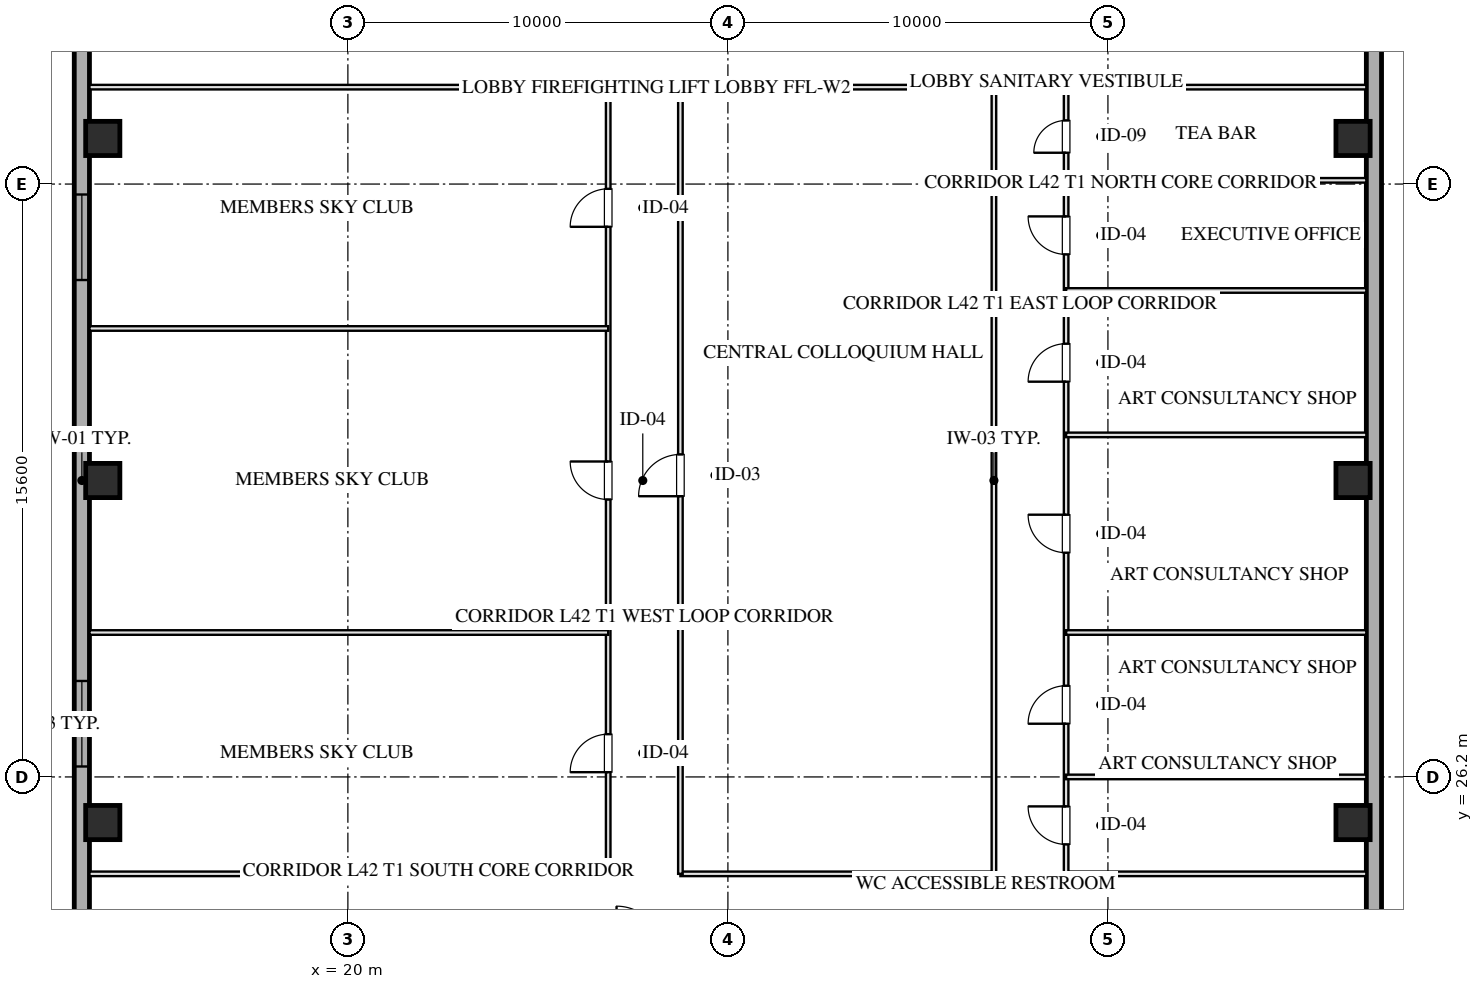
"""IFC4 building model, lengths in metres.
Left out: names, types, materials, properties, quantities, classifications, styles, units other than length and angle.
Written with IfcOpenShell. Run it as: python <this file> out.ifc"""

import sys

from ifc_helpers import new_model, si_unit, direction, frame, frame_2d, origin, origin_2d, place, context, subcontext, project, spatial, rectangle, hollow_rectangle, extrude, element, fill, save


model = new_model("IFC4")
c1 = context("Model", 3, precision=1e-05, world=origin(), true_north=direction((0.0, 1.0)))
c2 = subcontext(c1, "Body", "Model", "MODEL_VIEW")
j1 = project(units=[si_unit("LENGTHUNIT", "METRE"), si_unit("PLANEANGLEUNIT", "RADIAN")], contexts=[c1])
p1 = place(None, origin())
s1 = spatial("IfcSite", under=j1, at=p1, CompositionType="ELEMENT")
p2 = place(p1, origin())
s2 = spatial("IfcBuilding", under=s1, at=p2, CompositionType="ELEMENT")
p3 = place(p2, frame((0.0, 0.0, 159.85)))
s3 = spatial("IfcBuildingStorey", under=s2, at=p3, CompositionType="ELEMENT", Elevation=159.85)
for number, where, z_axis, x_axis in (
    (1, (13.55, 25.0, 0.0), (0.0, 0.0, 1.0), (1.0, 0.0, 0.0)),
    (2, (13.55, 34.0, 0.0), (0.0, 0.0, 1.0), (1.0, 0.0, 0.0)),
    (3, (13.55, 43.0, 0.0), (0.0, 0.0, 1.0), (1.0, 0.0, 0.0)),
    (4, (46.45, 25.0, 0.0), (0.0, 0.0, 1.0), (1.0, 0.0, 0.0)),
    (5, (46.45, 34.0, 0.0), (0.0, 0.0, 1.0), (1.0, 0.0, 0.0)),
    (6, (46.45, 43.0, 0.0), (0.0, 0.0, 1.0), (1.0, 0.0, 0.0)),
):
    element("IfcColumn", number, at=place(p3, frame(where, z_axis=z_axis, x_axis=x_axis)), inside=s3, PredefinedType="COLUMN", context=c2, shape_type="SweptSolid", body=[
        extrude(hollow_rectangle(XDim=0.9, YDim=0.9, WallThickness=0.032, at=origin_2d()), origin(), (0.0, 0.0, 1.0), 3.451),
    ])
p4 = place(p3, frame((13.0, 10.8, 0.0), z_axis=(0.0, 0.0, 1.0), x_axis=(0.0, 1.0, 0.0)))
e7 = element("IfcWall", 7, at=p4, inside=s3, PredefinedType="SOLIDWALL", context=c2, shape_type="SweptSolid", body=[
    extrude(rectangle(XDim=46.4, YDim=0.4, at=frame_2d((23.2, 0.0))), origin(), (0.0, 0.0, 1.0), 2.61),
])
p5 = place(p4, frame((15.675, 0.0, 0.75)))
e8 = element("IfcOpeningElement", 8, at=p5, cuts=e7, PredefinedType="OPENING", context=c2, shape_type="SweptSolid", body=[
    extrude(rectangle(XDim=2.25, YDim=1.46, at=frame_2d((1.125, 0.73))), frame((0.0, 0.21, 0.0), z_axis=(0.0, -1.0, 0.0), x_axis=(1.0, 0.0, 0.0)), (0.0, 0.0, 1.0), 0.42),
])
p6 = place(p4, frame((28.475, 0.0, 0.75)))
e9 = element("IfcOpeningElement", 9, at=p6, cuts=e7, PredefinedType="OPENING", context=c2, shape_type="SweptSolid", body=[
    extrude(rectangle(XDim=2.25, YDim=1.46, at=frame_2d((1.125, 0.73))), frame((0.0, 0.21, 0.0), z_axis=(0.0, -1.0, 0.0), x_axis=(1.0, 0.0, 0.0)), (0.0, 0.0, 1.0), 0.42),
])
p7 = place(p3, frame((47.0, 57.2, 0.0), z_axis=(0.0, 0.0, 1.0), x_axis=(0.0, -1.0, 0.0)))
e10 = element("IfcWall", 10, at=p7, inside=s3, PredefinedType="SOLIDWALL", context=c2, shape_type="SweptSolid", body=[
    extrude(rectangle(XDim=46.4, YDim=0.4, at=frame_2d((23.2, 0.0))), origin(), (0.0, 0.0, 1.0), 2.61),
])
p8 = place(p3, frame((13.2, 23.65, 0.0), z_axis=(0.0, 0.0, 1.0), x_axis=(1.0, 0.0, 0.0)))
e11 = element("IfcWall", 11, at=p8, inside=s3, PredefinedType="PARTITIONING", context=c2, shape_type="SweptSolid", body=[
    extrude(rectangle(XDim=13.65, YDim=0.12, at=frame_2d((6.825, 0.0))), origin(), (0.0, 0.0, 1.0), 3.175),
])
p9 = place(p3, frame((28.75, 23.65, 0.0), z_axis=(0.0, 0.0, 1.0), x_axis=(1.0, 0.0, 0.0)))
e12 = element("IfcWall", 12, at=p9, inside=s3, PredefinedType="PARTITIONING", context=c2, shape_type="SweptSolid", body=[
    extrude(rectangle(XDim=8.25, YDim=0.12, at=frame_2d((4.125, 0.0))), origin(), (0.0, 0.0, 1.0), 3.175),
])
p10 = place(p3, frame((38.9, 23.65, 0.0), z_axis=(0.0, 0.0, 1.0), x_axis=(1.0, 0.0, 0.0)))
e13 = element("IfcWall", 13, at=p10, inside=s3, PredefinedType="PARTITIONING", context=c2, shape_type="SweptSolid", body=[
    extrude(rectangle(XDim=7.9, YDim=0.12, at=frame_2d((3.95, 0.0))), origin(), (0.0, 0.0, 1.0), 3.175),
])
p11 = place(p3, frame((13.2, 44.35, 0.0), z_axis=(0.0, 0.0, 1.0), x_axis=(1.0, 0.0, 0.0)))
e14 = element("IfcWall", 14, at=p11, inside=s3, PredefinedType="PARTITIONING", context=c2, shape_type="SweptSolid", body=[
    extrude(rectangle(XDim=13.65, YDim=0.12, at=frame_2d((6.825, 0.0))), origin(), (0.0, 0.0, 1.0), 3.175),
])
p12 = place(p3, frame((28.75, 44.35, 0.0), z_axis=(0.0, 0.0, 1.0), x_axis=(1.0, 0.0, 0.0)))
e15 = element("IfcWall", 15, at=p12, inside=s3, PredefinedType="PARTITIONING", context=c2, shape_type="SweptSolid", body=[
    extrude(rectangle(XDim=8.25, YDim=0.12, at=frame_2d((4.125, 0.0))), origin(), (0.0, 0.0, 1.0), 3.175),
])
p13 = place(p3, frame((38.9, 44.35, 0.0), z_axis=(0.0, 0.0, 1.0), x_axis=(1.0, 0.0, 0.0)))
e16 = element("IfcWall", 16, at=p13, inside=s3, PredefinedType="PARTITIONING", context=c2, shape_type="SweptSolid", body=[
    extrude(rectangle(XDim=7.9, YDim=0.12, at=frame_2d((3.95, 0.0))), origin(), (0.0, 0.0, 1.0), 3.175),
])
p14 = place(p3, frame((26.85, 23.65, 0.0), z_axis=(0.0, 0.0, 1.0), x_axis=(0.0, 1.0, 0.0)))
e17 = element("IfcWall", 17, at=p14, inside=s3, PredefinedType="PARTITIONING", context=c2, shape_type="SweptSolid", body=[
    extrude(rectangle(XDim=20.7, YDim=0.12, at=frame_2d((10.35, 0.0))), origin(), (0.0, 0.0, 1.0), 3.175),
])
p15 = place(p14, frame((2.675, 0.0, 0.0)))
e18 = element("IfcOpeningElement", 18, at=p15, cuts=e17, PredefinedType="OPENING", context=c2, shape_type="SweptSolid", body=[
    extrude(rectangle(XDim=1.0, YDim=2.05, at=frame_2d((0.5, 1.025))), frame((0.0, 0.07, 0.0), z_axis=(0.0, -1.0, 0.0), x_axis=(1.0, 0.0, 0.0)), (0.0, 0.0, 1.0), 0.14),
])
p16 = place(p14, frame((9.85, 0.0, 0.0)))
e19 = element("IfcOpeningElement", 19, at=p16, cuts=e17, PredefinedType="OPENING", context=c2, shape_type="SweptSolid", body=[
    extrude(rectangle(XDim=1.0, YDim=2.05, at=frame_2d((0.5, 1.025))), frame((0.0, 0.07, 0.0), z_axis=(0.0, -1.0, 0.0), x_axis=(1.0, 0.0, 0.0)), (0.0, 0.0, 1.0), 0.14),
])
p17 = place(p14, frame((17.025, 0.0, 0.0)))
e20 = element("IfcOpeningElement", 20, at=p17, cuts=e17, PredefinedType="OPENING", context=c2, shape_type="SweptSolid", body=[
    extrude(rectangle(XDim=1.0, YDim=2.05, at=frame_2d((0.5, 1.025))), frame((0.0, 0.07, 0.0), z_axis=(0.0, -1.0, 0.0), x_axis=(1.0, 0.0, 0.0)), (0.0, 0.0, 1.0), 0.14),
])
p18 = place(p3, frame((28.75, 23.65, 0.0), z_axis=(0.0, 0.0, 1.0), x_axis=(0.0, 1.0, 0.0)))
e21 = element("IfcWall", 21, at=p18, inside=s3, PredefinedType="PARTITIONING", context=c2, shape_type="SweptSolid", body=[
    extrude(rectangle(XDim=20.7, YDim=0.12, at=frame_2d((10.35, 0.0))), origin(), (0.0, 0.0, 1.0), 3.175),
])
p19 = place(p18, frame((9.936, 0.0, 0.0)))
e22 = element("IfcOpeningElement", 22, at=p19, cuts=e21, PredefinedType="OPENING", context=c2, shape_type="SweptSolid", body=[
    extrude(rectangle(XDim=1.1, YDim=2.05, at=frame_2d((0.55, 1.025))), frame((0.0, 0.07, 0.0), z_axis=(0.0, -1.0, 0.0), x_axis=(1.0, 0.0, 0.0)), (0.0, 0.0, 1.0), 0.14),
])
p20 = place(p3, frame((37.0, 23.65, 0.0), z_axis=(0.0, 0.0, 1.0), x_axis=(0.0, 1.0, 0.0)))
e23 = element("IfcWall", 23, at=p20, inside=s3, PredefinedType="PARTITIONING", context=c2, shape_type="SweptSolid", body=[
    extrude(rectangle(XDim=20.7, YDim=0.12, at=frame_2d((10.35, 0.0))), origin(), (0.0, 0.0, 1.0), 3.175),
])
p21 = place(p3, frame((38.9, 23.65, 0.0), z_axis=(0.0, 0.0, 1.0), x_axis=(0.0, 1.0, 0.0)))
e24 = element("IfcWall", 24, at=p21, inside=s3, PredefinedType="PARTITIONING", context=c2, shape_type="SweptSolid", body=[
    extrude(rectangle(XDim=20.7, YDim=0.12, at=frame_2d((10.35, 0.0))), origin(), (0.0, 0.0, 1.0), 3.175),
])
p22 = place(p21, frame((0.775, 0.0, 0.0)))
e25 = element("IfcOpeningElement", 25, at=p22, cuts=e24, PredefinedType="OPENING", context=c2, shape_type="SweptSolid", body=[
    extrude(rectangle(XDim=1.0, YDim=2.05, at=frame_2d((0.5, 1.025))), frame((0.0, 0.07, 0.0), z_axis=(0.0, -1.0, 0.0), x_axis=(1.0, 0.0, 0.0)), (0.0, 0.0, 1.0), 0.14),
])
p23 = place(p21, frame((3.95, 0.0, 0.0)))
e26 = element("IfcOpeningElement", 26, at=p23, cuts=e24, PredefinedType="OPENING", context=c2, shape_type="SweptSolid", body=[
    extrude(rectangle(XDim=1.0, YDim=2.05, at=frame_2d((0.5, 1.025))), frame((0.0, 0.07, 0.0), z_axis=(0.0, -1.0, 0.0), x_axis=(1.0, 0.0, 0.0)), (0.0, 0.0, 1.0), 0.14),
])
p24 = place(p21, frame((8.45, 0.0, 0.0)))
e27 = element("IfcOpeningElement", 27, at=p24, cuts=e24, PredefinedType="OPENING", context=c2, shape_type="SweptSolid", body=[
    extrude(rectangle(XDim=1.0, YDim=2.05, at=frame_2d((0.5, 1.025))), frame((0.0, 0.07, 0.0), z_axis=(0.0, -1.0, 0.0), x_axis=(1.0, 0.0, 0.0)), (0.0, 0.0, 1.0), 0.14),
])
p25 = place(p21, frame((12.95, 0.0, 0.0)))
e28 = element("IfcOpeningElement", 28, at=p25, cuts=e24, PredefinedType="OPENING", context=c2, shape_type="SweptSolid", body=[
    extrude(rectangle(XDim=1.0, YDim=2.05, at=frame_2d((0.5, 1.025))), frame((0.0, 0.07, 0.0), z_axis=(0.0, -1.0, 0.0), x_axis=(1.0, 0.0, 0.0)), (0.0, 0.0, 1.0), 0.14),
])
p26 = place(p21, frame((16.299, 0.0, 0.0)))
e29 = element("IfcOpeningElement", 29, at=p26, cuts=e24, PredefinedType="OPENING", context=c2, shape_type="SweptSolid", body=[
    extrude(rectangle(XDim=1.0, YDim=2.05, at=frame_2d((0.5, 1.025))), frame((0.0, 0.07, 0.0), z_axis=(0.0, -1.0, 0.0), x_axis=(1.0, 0.0, 0.0)), (0.0, 0.0, 1.0), 0.14),
])
p27 = place(p21, frame((18.974, 0.0, 0.0)))
e30 = element("IfcOpeningElement", 30, at=p27, cuts=e24, PredefinedType="OPENING", context=c2, shape_type="SweptSolid", body=[
    extrude(rectangle(XDim=0.85, YDim=2.05, at=frame_2d((0.425, 1.025))), frame((0.0, 0.07, 0.0), z_axis=(0.0, -1.0, 0.0), x_axis=(1.0, 0.0, 0.0)), (0.0, 0.0, 1.0), 0.14),
])
for number, where, z_axis, x_axis in (
    (31, (13.2, 30.0, 0.0), (0.0, 0.0, 1.0), (1.0, 0.0, 0.0)),
    (32, (13.2, 38.0, 0.0), (0.0, 0.0, 1.0), (1.0, 0.0, 0.0)),
):
    element("IfcWall", number, at=place(p3, frame(where, z_axis=z_axis, x_axis=x_axis)), inside=s3, PredefinedType="PARTITIONING", context=c2, shape_type="SweptSolid", body=[
        extrude(rectangle(XDim=13.65, YDim=0.12, at=frame_2d((6.825, 0.0))), origin(), (0.0, 0.0, 1.0), 3.175),
    ])
for number, where, z_axis, x_axis in (
    (33, (38.9, 26.2, 0.0), (0.0, 0.0, 1.0), (1.0, 0.0, 0.0)),
    (34, (38.9, 30.0, 0.0), (0.0, 0.0, 1.0), (1.0, 0.0, 0.0)),
    (35, (38.9, 35.2, 0.0), (0.0, 0.0, 1.0), (1.0, 0.0, 0.0)),
    (36, (38.9, 39.0, 0.0), (0.0, 0.0, 1.0), (1.0, 0.0, 0.0)),
    (37, (38.9, 41.898, 0.0), (0.0, 0.0, 1.0), (1.0, 0.0, 0.0)),
):
    element("IfcWall", number, at=place(p3, frame(where, z_axis=z_axis, x_axis=x_axis)), inside=s3, PredefinedType="PARTITIONING", context=c2, shape_type="SweptSolid", body=[
        extrude(rectangle(XDim=7.9, YDim=0.12, at=frame_2d((3.95, 0.0))), origin(), (0.0, 0.0, 1.0), 3.175),
    ])
p28 = place(p5, origin())
e38 = element("IfcWindow", 38, at=p28, inside=s3, PartitioningType="TRIPLE_PANEL_VERTICAL", PredefinedType="WINDOW", context=c2, shape_type="SweptSolid", body=[
    extrude(rectangle(XDim=2.25, YDim=1.46, at=frame_2d((1.125, 0.73))), frame((0.0, 0.03, 0.0), z_axis=(0.0, -1.0, 0.0), x_axis=(1.0, 0.0, 0.0)), (0.0, 0.0, 1.0), 0.06),
])
fill(e8, e38)
p29 = place(p6, origin())
e39 = element("IfcWindow", 39, at=p29, inside=s3, PartitioningType="TRIPLE_PANEL_VERTICAL", PredefinedType="WINDOW", context=c2, shape_type="SweptSolid", body=[
    extrude(rectangle(XDim=2.25, YDim=1.46, at=frame_2d((1.125, 0.73))), frame((0.0, 0.03, 0.0), z_axis=(0.0, -1.0, 0.0), x_axis=(1.0, 0.0, 0.0)), (0.0, 0.0, 1.0), 0.06),
])
fill(e9, e39)
p30 = place(p15, origin())
e40 = element("IfcDoor", 40, at=p30, inside=s3, OperationType="SINGLE_SWING_LEFT", PredefinedType="DOOR", context=c2, shape_type="SweptSolid", body=[
    extrude(rectangle(XDim=1.0, YDim=2.05, at=frame_2d((0.5, 1.025))), frame((0.0, 0.025, 0.0), z_axis=(0.0, -1.0, 0.0), x_axis=(1.0, 0.0, 0.0)), (0.0, 0.0, 1.0), 0.05),
])
fill(e18, e40)
p31 = place(p16, origin())
e41 = element("IfcDoor", 41, at=p31, inside=s3, OperationType="SINGLE_SWING_RIGHT", PredefinedType="DOOR", context=c2, shape_type="SweptSolid", body=[
    extrude(rectangle(XDim=1.0, YDim=2.05, at=frame_2d((0.5, 1.025))), frame((0.0, 0.025, 0.0), z_axis=(0.0, -1.0, 0.0), x_axis=(1.0, 0.0, 0.0)), (0.0, 0.0, 1.0), 0.05),
])
fill(e19, e41)
p32 = place(p17, origin())
e42 = element("IfcDoor", 42, at=p32, inside=s3, OperationType="SINGLE_SWING_LEFT", PredefinedType="DOOR", context=c2, shape_type="SweptSolid", body=[
    extrude(rectangle(XDim=1.0, YDim=2.05, at=frame_2d((0.5, 1.025))), frame((0.0, 0.025, 0.0), z_axis=(0.0, -1.0, 0.0), x_axis=(1.0, 0.0, 0.0)), (0.0, 0.0, 1.0), 0.05),
])
fill(e20, e42)
p33 = place(p19, origin())
e43 = element("IfcDoor", 43, at=p33, inside=s3, OperationType="SINGLE_SWING_LEFT", PredefinedType="DOOR", context=c2, shape_type="SweptSolid", body=[
    extrude(rectangle(XDim=1.1, YDim=2.05, at=frame_2d((0.55, 1.025))), frame((0.0, 0.025, 0.0), z_axis=(0.0, -1.0, 0.0), x_axis=(1.0, 0.0, 0.0)), (0.0, 0.0, 1.0), 0.05),
])
fill(e22, e43)
p34 = place(p22, origin())
e44 = element("IfcDoor", 44, at=p34, inside=s3, OperationType="SINGLE_SWING_RIGHT", PredefinedType="DOOR", context=c2, shape_type="SweptSolid", body=[
    extrude(rectangle(XDim=1.0, YDim=2.05, at=frame_2d((0.5, 1.025))), frame((0.0, 0.025, 0.0), z_axis=(0.0, -1.0, 0.0), x_axis=(1.0, 0.0, 0.0)), (0.0, 0.0, 1.0), 0.05),
])
fill(e25, e44)
p35 = place(p23, origin())
e45 = element("IfcDoor", 45, at=p35, inside=s3, OperationType="SINGLE_SWING_LEFT", PredefinedType="DOOR", context=c2, shape_type="SweptSolid", body=[
    extrude(rectangle(XDim=1.0, YDim=2.05, at=frame_2d((0.5, 1.025))), frame((0.0, 0.025, 0.0), z_axis=(0.0, -1.0, 0.0), x_axis=(1.0, 0.0, 0.0)), (0.0, 0.0, 1.0), 0.05),
])
fill(e26, e45)
p36 = place(p24, origin())
e46 = element("IfcDoor", 46, at=p36, inside=s3, OperationType="SINGLE_SWING_RIGHT", PredefinedType="DOOR", context=c2, shape_type="SweptSolid", body=[
    extrude(rectangle(XDim=1.0, YDim=2.05, at=frame_2d((0.5, 1.025))), frame((0.0, 0.025, 0.0), z_axis=(0.0, -1.0, 0.0), x_axis=(1.0, 0.0, 0.0)), (0.0, 0.0, 1.0), 0.05),
])
fill(e27, e46)
p37 = place(p25, origin())
e47 = element("IfcDoor", 47, at=p37, inside=s3, OperationType="SINGLE_SWING_LEFT", PredefinedType="DOOR", context=c2, shape_type="SweptSolid", body=[
    extrude(rectangle(XDim=1.0, YDim=2.05, at=frame_2d((0.5, 1.025))), frame((0.0, 0.025, 0.0), z_axis=(0.0, -1.0, 0.0), x_axis=(1.0, 0.0, 0.0)), (0.0, 0.0, 1.0), 0.05),
])
fill(e28, e47)
p38 = place(p26, origin())
e48 = element("IfcDoor", 48, at=p38, inside=s3, OperationType="SINGLE_SWING_RIGHT", PredefinedType="DOOR", context=c2, shape_type="SweptSolid", body=[
    extrude(rectangle(XDim=1.0, YDim=2.05, at=frame_2d((0.5, 1.025))), frame((0.0, 0.025, 0.0), z_axis=(0.0, -1.0, 0.0), x_axis=(1.0, 0.0, 0.0)), (0.0, 0.0, 1.0), 0.05),
])
fill(e29, e48)
p39 = place(p27, origin())
e49 = element("IfcDoor", 49, at=p39, inside=s3, OperationType="SINGLE_SWING_LEFT", PredefinedType="DOOR", context=c2, shape_type="SweptSolid", body=[
    extrude(rectangle(XDim=0.85, YDim=2.05, at=frame_2d((0.425, 1.025))), frame((0.0, 0.025, 0.0), z_axis=(0.0, -1.0, 0.0), x_axis=(1.0, 0.0, 0.0)), (0.0, 0.0, 1.0), 0.05),
])
fill(e30, e49)
save(model, sys.argv[1])
